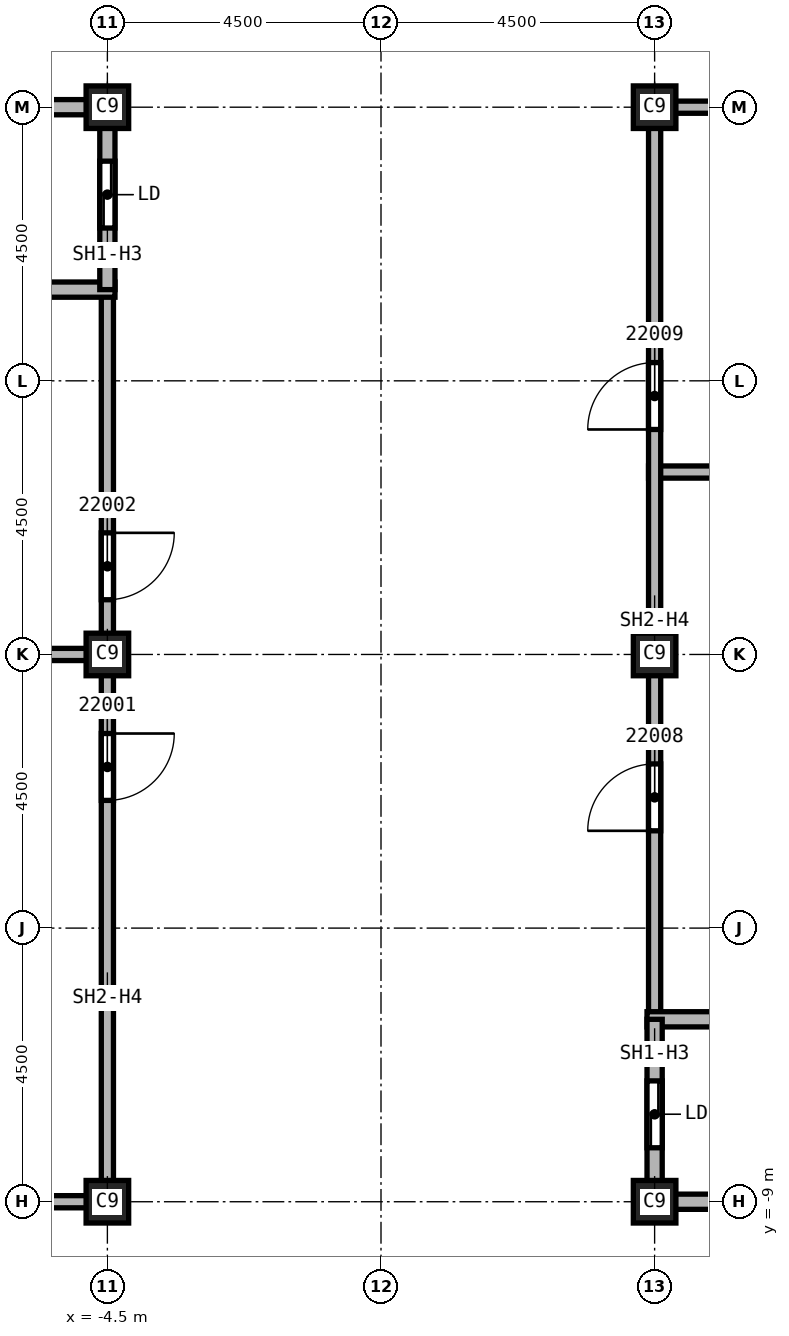
"""IFC4 building model, lengths in metres.
Left out: names, types, materials, properties, quantities, classifications, styles, units other than length and angle.
Written with IfcOpenShell. Run it as: python <this file> out.ifc"""

import sys

from ifc_helpers import new_model, si_unit, direction, frame, frame_2d, origin, origin_2d, place, context, subcontext, project, spatial, rectangle, extrude, element, fill, save


model = new_model("IFC4")
c1 = context("Model", 3, precision=1e-05, world=origin(), true_north=direction((0.0, 1.0)))
c2 = subcontext(c1, "Body", "Model", "MODEL_VIEW")
j1 = project(units=[si_unit("LENGTHUNIT", "METRE"), si_unit("PLANEANGLEUNIT", "RADIAN")], contexts=[c1])
p1 = place(None, origin())
s1 = spatial("IfcSite", under=j1, at=p1, CompositionType="ELEMENT")
p2 = place(p1, origin())
s2 = spatial("IfcBuilding", under=s1, at=p2, CompositionType="ELEMENT")
p3 = place(p2, frame((0.0, 0.0, 312.0)))
s3 = spatial("IfcBuildingStorey", under=s2, at=p3, CompositionType="ELEMENT", Elevation=312.0)
for number, where, z_axis, x_axis in (
    (1, (4.5, 0.0, 0.0), (0.0, 0.0, 1.0), (1.0, 0.0, 0.0)),
    (2, (4.5, 9.0, 0.0), (0.0, 0.0, 1.0), (1.0, 0.0, 0.0)),
    (3, (4.5, -9.0, 0.0), (0.0, 0.0, 1.0), (1.0, 0.0, 0.0)),
    (4, (-4.5, 0.0, 0.0), (0.0, 0.0, 1.0), (1.0, 0.0, 0.0)),
    (5, (-4.5, 9.0, 0.0), (0.0, 0.0, 1.0), (1.0, 0.0, 0.0)),
    (6, (-4.5, -9.0, 0.0), (0.0, 0.0, 1.0), (1.0, 0.0, 0.0)),
):
    element("IfcColumn", number, at=place(p3, frame(where, z_axis=z_axis, x_axis=x_axis)), inside=s3, PredefinedType="COLUMN", context=c2, shape_type="SweptSolid", body=[
        extrude(rectangle(XDim=0.7, YDim=0.7, at=origin_2d()), origin(), (0.0, 0.0, 1.0), 3.74),
    ])
p4 = place(p3, frame((-7.625, 0.0, 0.0), z_axis=(0.0, 0.0, 1.0), x_axis=(1.0, 0.0, 0.0)))
e7 = element("IfcWall", 7, at=p4, inside=s3, PredefinedType="SOLIDWALL", context=c2, shape_type="SweptSolid", body=[
    extrude(rectangle(XDim=3.225, YDim=0.2, at=frame_2d((1.613, 0.0))), origin(), (0.0, 0.0, 1.0), 3.74),
])
p5 = place(p3, frame((-4.5, -9.0, 0.0), z_axis=(0.0, 0.0, 1.0), x_axis=(-1.0, 0.0, 0.0)))
e8 = element("IfcWall", 8, at=p5, inside=s3, PredefinedType="SOLIDWALL", context=c2, shape_type="SweptSolid", body=[
    extrude(rectangle(XDim=3.0, YDim=0.2, at=frame_2d((1.5, 0.0))), origin(), (0.0, 0.0, 1.0), 3.062),
])
p6 = place(p3, frame((-4.5, 6.0, 0.0), z_axis=(0.0, 0.0, 1.0), x_axis=(0.0, -1.0, 0.0)))
e9 = element("IfcWall", 9, at=p6, inside=s3, PredefinedType="SOLIDWALL", context=c2, shape_type="SweptSolid", body=[
    extrude(rectangle(XDim=15.1, YDim=0.2, at=frame_2d((7.55, 0.0))), origin(), (0.0, 0.0, 1.0), 3.062),
])
p7 = place(p6, frame((7.3, 0.0, 0.0)))
e10 = element("IfcOpeningElement", 10, at=p7, cuts=e9, PredefinedType="OPENING", context=c2, shape_type="SweptSolid", body=[
    extrude(rectangle(XDim=1.1, YDim=2.1, at=frame_2d((0.55, 1.05))), frame((0.0, 0.1, 0.0), z_axis=(0.0, -1.0, 0.0), x_axis=(1.0, 0.0, 0.0)), (0.0, 0.0, 1.0), 0.2),
])
p8 = place(p6, frame((4.0, 0.0, 0.0)))
e11 = element("IfcOpeningElement", 11, at=p8, cuts=e9, PredefinedType="OPENING", context=c2, shape_type="SweptSolid", body=[
    extrude(rectangle(XDim=1.1, YDim=2.1, at=frame_2d((0.55, 1.05))), frame((0.0, 0.1, 0.0), z_axis=(0.0, -1.0, 0.0), x_axis=(1.0, 0.0, 0.0)), (0.0, 0.0, 1.0), 0.2),
])
p9 = place(p3, frame((4.4, 3.0, 0.0), z_axis=(0.0, 0.0, 1.0), x_axis=(1.0, 0.0, 0.0)))
e12 = element("IfcWall", 12, at=p9, inside=s3, PredefinedType="SOLIDWALL", context=c2, shape_type="SweptSolid", body=[
    extrude(rectangle(XDim=3.225, YDim=0.2, at=frame_2d((1.613, 0.0))), origin(), (0.0, 0.0, 1.0), 3.74),
])
p10 = place(p3, frame((4.5, -6.0, 0.0), z_axis=(0.0, 0.0, 1.0), x_axis=(0.0, 1.0, 0.0)))
e13 = element("IfcWall", 13, at=p10, inside=s3, PredefinedType="SOLIDWALL", context=c2, shape_type="SweptSolid", body=[
    extrude(rectangle(XDim=15.1, YDim=0.2, at=frame_2d((7.55, 0.0))), origin(), (0.0, 0.0, 1.0), 3.062),
])
p11 = place(p10, frame((3.1, 0.0, 0.0)))
e14 = element("IfcOpeningElement", 14, at=p11, cuts=e13, PredefinedType="OPENING", context=c2, shape_type="SweptSolid", body=[
    extrude(rectangle(XDim=1.1, YDim=2.1, at=frame_2d((0.55, 1.05))), frame((0.0, 0.1, 0.0), z_axis=(0.0, -1.0, 0.0), x_axis=(1.0, 0.0, 0.0)), (0.0, 0.0, 1.0), 0.2),
])
p12 = place(p10, frame((9.7, 0.0, 0.0)))
e15 = element("IfcOpeningElement", 15, at=p12, cuts=e13, PredefinedType="OPENING", context=c2, shape_type="SweptSolid", body=[
    extrude(rectangle(XDim=1.1, YDim=2.1, at=frame_2d((0.55, 1.05))), frame((0.0, 0.1, 0.0), z_axis=(0.0, -1.0, 0.0), x_axis=(1.0, 0.0, 0.0)), (0.0, 0.0, 1.0), 0.2),
])
p13 = place(p3, frame((4.5, 9.0, 0.0), z_axis=(0.0, 0.0, 1.0), x_axis=(1.0, 0.0, 0.0)))
e16 = element("IfcWall", 16, at=p13, inside=s3, PredefinedType="SOLIDWALL", context=c2, shape_type="SweptSolid", body=[
    extrude(rectangle(XDim=3.0, YDim=0.2, at=frame_2d((1.5, 0.0))), origin(), (0.0, 0.0, 1.0), 3.062),
])
p14 = place(p3, frame((-7.625, 6.0, 0.0), z_axis=(0.0, 0.0, 1.0), x_axis=(1.0, 0.0, 0.0)))
e17 = element("IfcWall", 17, at=p14, inside=s3, PredefinedType="SOLIDWALL", context=c2, shape_type="SweptSolid", body=[
    extrude(rectangle(XDim=3.25, YDim=0.25, at=frame_2d((1.625, 0.0))), origin(), (0.0, 0.0, 1.0), 3.74),
])
p15 = place(p3, frame((-7.5, 9.0, 0.0), z_axis=(0.0, 0.0, 1.0), x_axis=(1.0, 0.0, 0.0)))
e18 = element("IfcWall", 18, at=p15, inside=s3, PredefinedType="SOLIDWALL", context=c2, shape_type="SweptSolid", body=[
    extrude(rectangle(XDim=3.0, YDim=0.25, at=frame_2d((1.5, 0.0))), origin(), (0.0, 0.0, 1.0), 3.062),
])
p16 = place(p3, frame((-4.5, 9.125, 0.0), z_axis=(0.0, 0.0, 1.0), x_axis=(0.0, -1.0, 0.0)))
e19 = element("IfcWall", 19, at=p16, inside=s3, PredefinedType="SOLIDWALL", context=c2, shape_type="SweptSolid", body=[
    extrude(rectangle(XDim=3.125, YDim=0.25, at=frame_2d((1.562, 0.0))), origin(), (0.0, 0.0, 1.0), 3.062),
])
p17 = place(p16, frame((1.012, 0.0, 0.0)))
e20 = element("IfcOpeningElement", 20, at=p17, cuts=e19, PredefinedType="OPENING", context=c2, shape_type="SweptSolid", body=[
    extrude(rectangle(XDim=1.1, YDim=2.1, at=frame_2d((0.55, 1.05))), frame((0.0, 0.125, 0.0), z_axis=(0.0, -1.0, 0.0), x_axis=(1.0, 0.0, 0.0)), (0.0, 0.0, 1.0), 0.25),
])
p18 = place(p3, frame((4.375, -6.0, 0.0), z_axis=(0.0, 0.0, 1.0), x_axis=(1.0, 0.0, 0.0)))
e21 = element("IfcWall", 21, at=p18, inside=s3, PredefinedType="SOLIDWALL", context=c2, shape_type="SweptSolid", body=[
    extrude(rectangle(XDim=3.25, YDim=0.25, at=frame_2d((1.625, 0.0))), origin(), (0.0, 0.0, 1.0), 3.74),
])
p19 = place(p3, frame((4.5, -9.125, 0.0), z_axis=(0.0, 0.0, 1.0), x_axis=(0.0, 1.0, 0.0)))
e22 = element("IfcWall", 22, at=p19, inside=s3, PredefinedType="SOLIDWALL", context=c2, shape_type="SweptSolid", body=[
    extrude(rectangle(XDim=3.125, YDim=0.25, at=frame_2d((1.562, 0.0))), origin(), (0.0, 0.0, 1.0), 3.062),
])
p20 = place(p19, frame((1.012, 0.0, 0.0)))
e23 = element("IfcOpeningElement", 23, at=p20, cuts=e22, PredefinedType="OPENING", context=c2, shape_type="SweptSolid", body=[
    extrude(rectangle(XDim=1.1, YDim=2.1, at=frame_2d((0.55, 1.05))), frame((0.0, 0.125, 0.0), z_axis=(0.0, -1.0, 0.0), x_axis=(1.0, 0.0, 0.0)), (0.0, 0.0, 1.0), 0.25),
])
p21 = place(p3, frame((7.5, -9.0, 0.0), z_axis=(0.0, 0.0, 1.0), x_axis=(-1.0, 0.0, 0.0)))
e24 = element("IfcWall", 24, at=p21, inside=s3, PredefinedType="SOLIDWALL", context=c2, shape_type="SweptSolid", body=[
    extrude(rectangle(XDim=3.0, YDim=0.25, at=frame_2d((1.5, 0.0))), origin(), (0.0, 0.0, 1.0), 3.062),
])
p22 = place(p7, origin())
e25 = element("IfcDoor", 25, at=p22, inside=s3, OperationType="SINGLE_SWING_RIGHT", PredefinedType="DOOR", context=c2, shape_type="SweptSolid", body=[
    extrude(rectangle(XDim=1.1, YDim=2.1, at=frame_2d((0.55, 1.05))), frame((0.0, 0.025, 0.0), z_axis=(0.0, -1.0, 0.0), x_axis=(1.0, 0.0, 0.0)), (0.0, 0.0, 1.0), 0.05),
])
fill(e10, e25)
p23 = place(p8, origin())
e26 = element("IfcDoor", 26, at=p23, inside=s3, OperationType="SINGLE_SWING_LEFT", PredefinedType="DOOR", context=c2, shape_type="SweptSolid", body=[
    extrude(rectangle(XDim=1.1, YDim=2.1, at=frame_2d((0.55, 1.05))), frame((0.0, 0.025, 0.0), z_axis=(0.0, -1.0, 0.0), x_axis=(1.0, 0.0, 0.0)), (0.0, 0.0, 1.0), 0.05),
])
fill(e11, e26)
p24 = place(p11, origin())
e27 = element("IfcDoor", 27, at=p24, inside=s3, OperationType="SINGLE_SWING_LEFT", PredefinedType="DOOR", context=c2, shape_type="SweptSolid", body=[
    extrude(rectangle(XDim=1.1, YDim=2.1, at=frame_2d((0.55, 1.05))), frame((0.0, 0.025, 0.0), z_axis=(0.0, -1.0, 0.0), x_axis=(1.0, 0.0, 0.0)), (0.0, 0.0, 1.0), 0.05),
])
fill(e14, e27)
p25 = place(p12, origin())
e28 = element("IfcDoor", 28, at=p25, inside=s3, OperationType="SINGLE_SWING_RIGHT", PredefinedType="DOOR", context=c2, shape_type="SweptSolid", body=[
    extrude(rectangle(XDim=1.1, YDim=2.1, at=frame_2d((0.55, 1.05))), frame((0.0, 0.025, 0.0), z_axis=(0.0, -1.0, 0.0), x_axis=(1.0, 0.0, 0.0)), (0.0, 0.0, 1.0), 0.05),
])
fill(e15, e28)
p26 = place(p17, origin())
e29 = element("IfcDoor", 29, at=p26, inside=s3, OperationType="SLIDING_TO_LEFT", PredefinedType="DOOR", context=c2, shape_type="SweptSolid", body=[
    extrude(rectangle(XDim=1.1, YDim=2.1, at=frame_2d((0.55, 1.05))), frame((0.0, 0.025, 0.0), z_axis=(0.0, -1.0, 0.0), x_axis=(1.0, 0.0, 0.0)), (0.0, 0.0, 1.0), 0.05),
])
fill(e20, e29)
p27 = place(p20, origin())
e30 = element("IfcDoor", 30, at=p27, inside=s3, OperationType="SLIDING_TO_LEFT", PredefinedType="DOOR", context=c2, shape_type="SweptSolid", body=[
    extrude(rectangle(XDim=1.1, YDim=2.1, at=frame_2d((0.55, 1.05))), frame((0.0, 0.025, 0.0), z_axis=(0.0, -1.0, 0.0), x_axis=(1.0, 0.0, 0.0)), (0.0, 0.0, 1.0), 0.05),
])
fill(e23, e30)
save(model, sys.argv[1])
